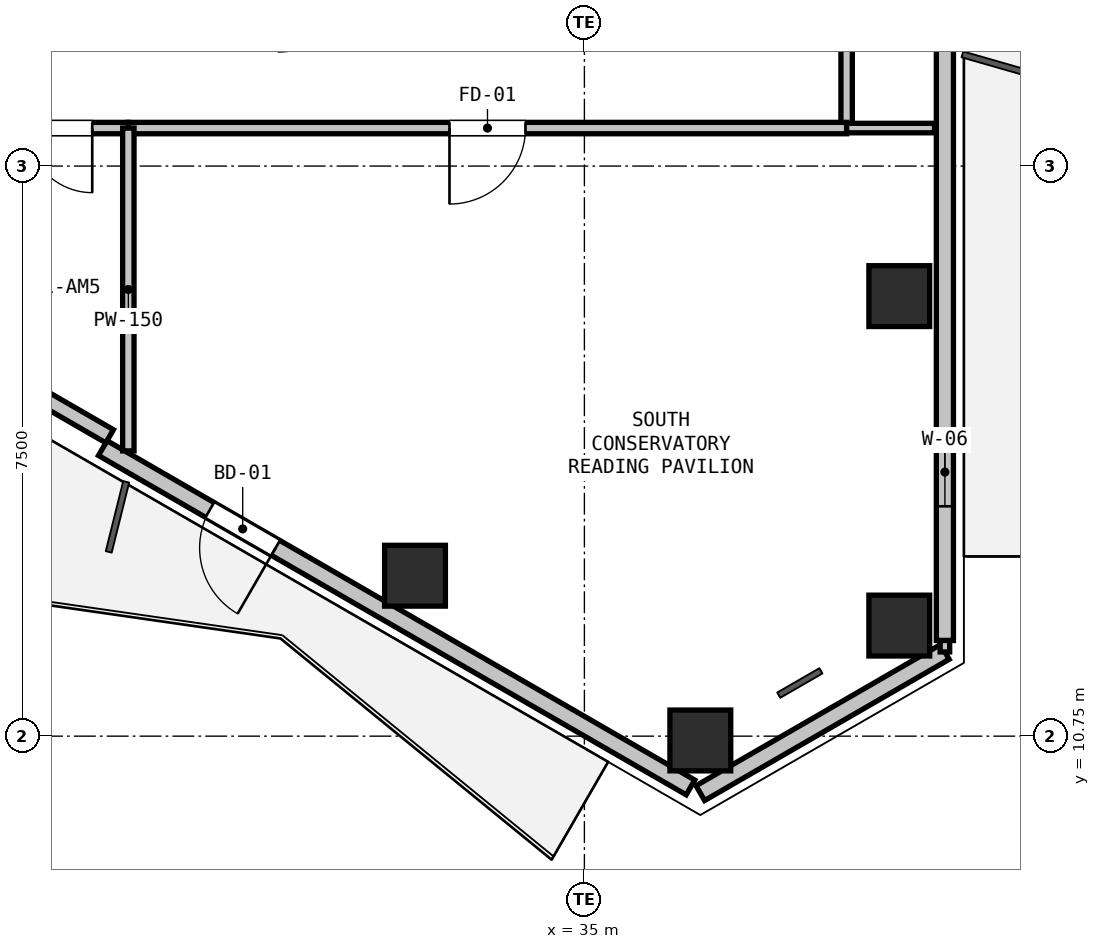
"""IFC4 building model, lengths in metres.
Left out: names, types, materials, properties, quantities, classifications, styles, units other than length and angle.
Written with IfcOpenShell. Run it as: python <this file> out.ifc"""

import sys

from ifc_helpers import new_model, si_unit, direction, frame, frame_2d, origin, origin_2d, place, context, subcontext, project, spatial, rectangle, hollow_rectangle, extrude, element, fill, save


model = new_model("IFC4")
c1 = context("Model", 3, precision=1e-05, world=origin(), true_north=direction((0.0, 1.0)))
c2 = subcontext(c1, "Body", "Model", "MODEL_VIEW")
j1 = project(units=[si_unit("LENGTHUNIT", "METRE"), si_unit("PLANEANGLEUNIT", "RADIAN")], contexts=[c1])
p1 = place(None, origin())
s1 = spatial("IfcSite", under=j1, at=p1, CompositionType="ELEMENT")
p2 = place(p1, origin())
s2 = spatial("IfcBuilding", under=s1, at=p2, CompositionType="ELEMENT")
p3 = place(p2, frame((0.0, 0.0, 254.1)))
s3 = spatial("IfcBuildingStorey", under=s2, at=p3, CompositionType="ELEMENT", Elevation=254.1)
for number, where, z_axis, x_axis in (
    (1, (39.143, 16.539, 0.0), (0.0, 0.0, 1.0), (1.0, 0.0, 0.0)),
    (2, (39.143, 12.205, 0.0), (0.0, 0.0, 1.0), (1.0, 0.0, 0.0)),
    (3, (36.525, 10.693, 0.0), (0.0, 0.0, 1.0), (1.0, 0.0, 0.0)),
    (4, (32.771, 12.861, 0.0), (0.0, 0.0, 1.0), (1.0, 0.0, 0.0)),
):
    element("IfcColumn", number, at=place(p3, frame(where, z_axis=z_axis, x_axis=x_axis)), inside=s3, PredefinedType="COLUMN", context=c2, shape_type="SweptSolid", body=[
        extrude(hollow_rectangle(XDim=0.8, YDim=0.8, WallThickness=0.025, at=origin_2d()), origin(), (0.0, 0.0, 1.0), 4.5),
    ])
p4 = place(p3, frame((39.743, 11.858, 0.0), z_axis=(0.0, 0.0, 1.0), x_axis=(-0.866038962515, -0.499976514854, 0.0)))
e5 = element("IfcWall", 5, at=p4, inside=s3, PredefinedType="SOLIDWALL", context=c2, shape_type="SweptSolid", body=[
    extrude(rectangle(XDim=3.716, YDim=0.225, at=frame_2d((1.858, 0.0))), origin(), (0.0, 0.0, 1.0), 3.8),
])
p5 = place(p3, frame((39.743, 20.936, 0.0), z_axis=(0.0, 0.0, 1.0), x_axis=(0.0, -1.0, 0.0)))
e6 = element("IfcWall", 6, at=p5, inside=s3, PredefinedType="SOLIDWALL", context=c2, shape_type="SweptSolid", body=[
    extrude(rectangle(XDim=8.928, YDim=0.225, at=frame_2d((4.464, 0.0))), origin(), (0.0, 0.0, 1.0), 3.8),
])
p6 = place(p5, frame((6.262, 0.0, 0.9)))
e7 = element("IfcOpeningElement", 7, at=p6, cuts=e6, PredefinedType="OPENING", context=c2, shape_type="SweptSolid", body=[
    extrude(rectangle(XDim=0.9, YDim=1.4, at=frame_2d((0.45, 0.7))), frame((0.0, 0.123, 0.0), z_axis=(0.0, -1.0, 0.0), x_axis=(1.0, 0.0, 0.0)), (0.0, 0.0, 1.0), 0.245),
])
p7 = place(p3, frame((36.395, 10.076, 0.0), z_axis=(0.0, 0.0, 1.0), x_axis=(-0.866026655105, 0.499997832642, 0.0)))
e8 = element("IfcWall", 8, at=p7, inside=s3, PredefinedType="SOLIDWALL", context=c2, shape_type="SweptSolid", body=[
    extrude(rectangle(XDim=8.928, YDim=0.225, at=frame_2d((4.464, 0.0))), origin(), (0.0, 0.0, 1.0), 3.8),
])
p8 = place(p7, frame((6.302, 0.0, 0.0)))
e9 = element("IfcOpeningElement", 9, at=p8, cuts=e8, PredefinedType="OPENING", context=c2, shape_type="SweptSolid", body=[
    extrude(rectangle(XDim=1.0, YDim=2.1, at=frame_2d((0.5, 1.05))), frame((0.0, 0.123, 0.0), z_axis=(0.0, -1.0, 0.0), x_axis=(1.0, 0.0, 0.0)), (0.0, 0.0, 1.0), 0.245),
])
p9 = place(p3, frame((28.754, 14.695, 0.0), z_axis=(0.0, 0.0, 1.0), x_axis=(-0.866025371046, 0.500000056704, 0.0)))
e10 = element("IfcWall", 10, at=p9, inside=s3, PredefinedType="PARAPET", context=c2, shape_type="SweptSolid", body=[
    extrude(rectangle(XDim=1.7, YDim=0.2, at=frame_2d((0.85, 0.0))), origin(), (0.0, 0.0, 1.0), 3.8),
])
p10 = place(p3, frame((38.45, 34.75, 0.0), z_axis=(0.0, 0.0, 1.0), x_axis=(0.0, -1.0, 0.0)))
e11 = element("IfcWall", 11, at=p10, inside=s3, PredefinedType="PARTITIONING", context=c2, shape_type="SweptSolid", body=[
    extrude(rectangle(XDim=16.0, YDim=0.15, at=frame_2d((8.0, 0.0))), origin(), (0.0, 0.0, 1.0), 4.18),
])
p11 = place(p10, frame((7.1, 0.0, 0.0)))
e12 = element("IfcOpeningElement", 12, at=p11, cuts=e11, PredefinedType="OPENING", context=c2, shape_type="SweptSolid", body=[
    extrude(rectangle(XDim=1.8, YDim=2.2, at=frame_2d((0.9, 1.1))), frame((0.0, 0.085, 0.0), z_axis=(0.0, -1.0, 0.0), x_axis=(1.0, 0.0, 0.0)), (0.0, 0.0, 1.0), 0.17),
])
p12 = place(p3, frame((38.45, 18.75, 0.0), z_axis=(0.0, 0.0, 1.0), x_axis=(-1.0, 0.0, 0.0)))
e13 = element("IfcWall", 13, at=p12, inside=s3, PredefinedType="PARTITIONING", context=c2, shape_type="SweptSolid", body=[
    extrude(rectangle(XDim=9.45, YDim=0.15, at=frame_2d((4.725, 0.0))), origin(), (0.0, 0.0, 1.0), 3.628),
])
p13 = place(p12, frame((4.225, 0.0, 0.0)))
e14 = element("IfcOpeningElement", 14, at=p13, cuts=e13, PredefinedType="OPENING", context=c2, shape_type="SweptSolid", body=[
    extrude(rectangle(XDim=1.0, YDim=2.15, at=frame_2d((0.5, 1.075))), frame((0.0, 0.085, 0.0), z_axis=(0.0, -1.0, 0.0), x_axis=(1.0, 0.0, 0.0)), (0.0, 0.0, 1.0), 0.17),
])
p14 = place(p3, frame((29.0, 18.75, 0.0), z_axis=(0.0, 0.0, 1.0), x_axis=(-1.0, 0.0, 0.0)))
e15 = element("IfcWall", 15, at=p14, inside=s3, PredefinedType="PARTITIONING", context=c2, shape_type="SweptSolid", body=[
    extrude(rectangle(XDim=1.8, YDim=0.15, at=frame_2d((0.9, 0.0))), origin(), (0.0, 0.0, 1.0), 4.18),
])
p15 = place(p14, frame((0.475, 0.0, 0.0)))
e16 = element("IfcOpeningElement", 16, at=p15, cuts=e15, PredefinedType="OPENING", context=c2, shape_type="SweptSolid", body=[
    extrude(rectangle(XDim=0.85, YDim=2.1, at=frame_2d((0.425, 1.05))), frame((0.0, 0.085, 0.0), z_axis=(0.0, -1.0, 0.0), x_axis=(1.0, 0.0, 0.0)), (0.0, 0.0, 1.0), 0.17),
])
p16 = place(p3, frame((39.606, 18.75, 0.0), z_axis=(0.0, 0.0, 1.0), x_axis=(-1.0, 0.0, 0.0)))
e17 = element("IfcWall", 17, at=p16, inside=s3, PredefinedType="PARTITIONING", context=c2, shape_type="SweptSolid", body=[
    extrude(rectangle(XDim=1.156, YDim=0.125, at=frame_2d((0.578, 0.0))), origin(), (0.0, 0.0, 1.0), 2.365),
])
p17 = place(p3, frame((29.0, 14.503, 0.0), z_axis=(0.0, 0.0, 1.0), x_axis=(0.0, 1.0, 0.0)))
e18 = element("IfcWall", 18, at=p17, inside=s3, PredefinedType="PARTITIONING", context=c2, shape_type="SweptSolid", body=[
    extrude(rectangle(XDim=4.247, YDim=0.15, at=frame_2d((2.124, 0.0))), origin(), (0.0, 0.0, 1.0), 2.365),
])
p18 = place(p3, frame((39.743, 12.008, 0.0), z_axis=(0.0, 0.0, 1.0), x_axis=(0.0, -1.0, 0.0)))
e19 = element("IfcWall", 19, at=p18, inside=s3, PredefinedType="PARTITIONING", context=c2, shape_type="SweptSolid", body=[
    extrude(rectangle(XDim=0.15, YDim=0.125, at=frame_2d((0.075, 0.0))), origin(), (0.0, 0.0, 1.0), 4.18),
])
p19 = place(p6, origin())
e20 = element("IfcWindow", 20, at=p19, inside=s3, PartitioningType="SINGLE_PANEL", PredefinedType="WINDOW", context=c2, shape_type="SweptSolid", body=[
    extrude(rectangle(XDim=0.9, YDim=1.4, at=frame_2d((0.45, 0.7))), frame((0.0, 0.03, 0.0), z_axis=(0.0, -1.0, 0.0), x_axis=(1.0, 0.0, 0.0)), (0.0, 0.0, 1.0), 0.06),
])
fill(e7, e20)
p20 = place(p8, origin())
e21 = element("IfcDoor", 21, at=p20, inside=s3, OperationType="SINGLE_SWING_LEFT", PredefinedType="DOOR", context=c2, shape_type="SweptSolid", body=[
    extrude(rectangle(XDim=1.0, YDim=2.1, at=frame_2d((0.5, 1.05))), frame((0.0, 0.025, 0.0), z_axis=(0.0, -1.0, 0.0), x_axis=(1.0, 0.0, 0.0)), (0.0, 0.0, 1.0), 0.05),
])
fill(e9, e21)
p21 = place(p13, origin())
e22 = element("IfcDoor", 22, at=p21, inside=s3, OperationType="SINGLE_SWING_RIGHT", PredefinedType="DOOR", context=c2, shape_type="SweptSolid", body=[
    extrude(rectangle(XDim=1.0, YDim=2.15, at=frame_2d((0.5, 1.075))), frame((0.0, 0.025, 0.0), z_axis=(0.0, -1.0, 0.0), x_axis=(1.0, 0.0, 0.0)), (0.0, 0.0, 1.0), 0.05),
])
fill(e14, e22)
p22 = place(p15, origin())
e23 = element("IfcDoor", 23, at=p22, inside=s3, OperationType="SINGLE_SWING_LEFT", PredefinedType="DOOR", context=c2, shape_type="SweptSolid", body=[
    extrude(rectangle(XDim=0.85, YDim=2.1, at=frame_2d((0.425, 1.05))), frame((0.0, 0.025, 0.0), z_axis=(0.0, -1.0, 0.0), x_axis=(1.0, 0.0, 0.0)), (0.0, 0.0, 1.0), 0.05),
])
fill(e16, e23)
save(model, sys.argv[1])
